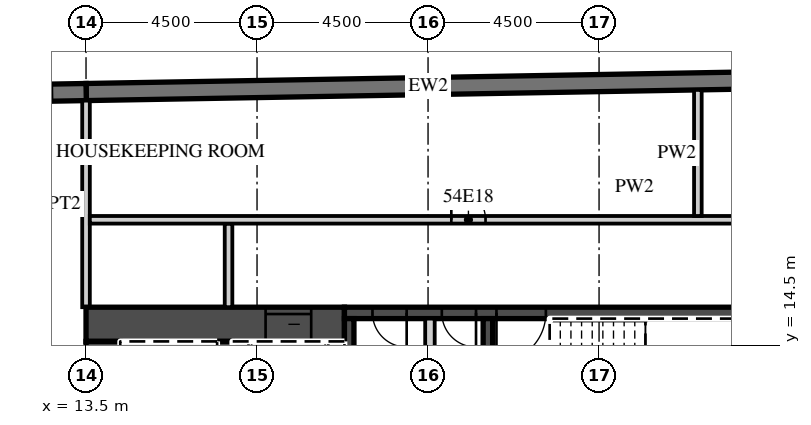
"""IFC4 building model, lengths in metres.
Left out: names, types, materials, properties, quantities, classifications, styles, units other than length and angle.
Written with IfcOpenShell. Run it as: python <this file> out.ifc"""

import sys

from ifc_helpers import new_model, si_unit, direction, frame, frame_2d, origin, place, context, subcontext, project, spatial, rectangle, extrude, element, fill, save


model = new_model("IFC4")
c1 = context("Model", 3, precision=1e-05, world=origin(), true_north=direction((0.0, 1.0)))
c2 = subcontext(c1, "Body", "Model", "MODEL_VIEW")
j1 = project(units=[si_unit("LENGTHUNIT", "METRE"), si_unit("PLANEANGLEUNIT", "RADIAN")], contexts=[c1])
p1 = place(None, origin())
s1 = spatial("IfcSite", under=j1, at=p1, CompositionType="ELEMENT")
p2 = place(p1, origin())
s2 = spatial("IfcBuilding", under=s1, at=p2, CompositionType="ELEMENT")
p3 = place(p2, frame((0.0, 0.0, 224.3)))
s3 = spatial("IfcBuildingStorey", under=s2, at=p3, CompositionType="ELEMENT", Elevation=224.3)
p4 = place(p3, frame((31.504, 21.476, 0.0), z_axis=(0.0, 0.0, 1.0), x_axis=(-0.999847677887, -0.017453395744, 0.0)))
e1 = element("IfcWall", 1, at=p4, inside=s3, PredefinedType="SOLIDWALL", context=c2, shape_type="SweptSolid", body=[
    extrude(rectangle(XDim=18.003, YDim=0.45, at=frame_2d((9.001, 0.0))), origin(), (0.0, 0.0, 1.0), 3.02),
])
p5 = place(p3, frame((13.504, 21.161, 0.0), z_axis=(0.0, 0.0, 1.0), x_axis=(-0.999847763257, -0.017448504532, 0.0)))
e2 = element("IfcWall", 2, at=p5, inside=s3, PredefinedType="SOLIDWALL", context=c2, shape_type="SweptSolid", body=[
    extrude(rectangle(XDim=46.859, YDim=0.45, at=frame_2d((23.43, 0.0))), origin(), (0.0, 0.0, 1.0), 3.02),
])
p6 = place(p5, frame((0.9, 0.0, 0.45)))
e3 = element("IfcOpeningElement", 3, at=p6, cuts=e2, PredefinedType="OPENING", context=c2, shape_type="SweptSolid", body=[
    extrude(rectangle(XDim=2.7, YDim=2.25, at=frame_2d((1.35, 1.125))), frame((0.0, 0.235, 0.0), z_axis=(0.0, -1.0, 0.0), x_axis=(1.0, 0.0, 0.0)), (0.0, 0.0, 1.0), 0.47),
])
p7 = place(p5, frame((5.401, 0.0, 0.45)))
e4 = element("IfcOpeningElement", 4, at=p7, cuts=e2, PredefinedType="OPENING", context=c2, shape_type="SweptSolid", body=[
    extrude(rectangle(XDim=2.7, YDim=2.25, at=frame_2d((1.35, 1.125))), frame((0.0, 0.235, 0.0), z_axis=(0.0, -1.0, 0.0), x_axis=(1.0, 0.0, 0.0)), (0.0, 0.0, 1.0), 0.47),
])
p8 = place(p5, frame((9.902, 0.0, 0.45)))
e5 = element("IfcOpeningElement", 5, at=p8, cuts=e2, PredefinedType="OPENING", context=c2, shape_type="SweptSolid", body=[
    extrude(rectangle(XDim=2.7, YDim=2.25, at=frame_2d((1.35, 1.125))), frame((0.0, 0.235, 0.0), z_axis=(0.0, -1.0, 0.0), x_axis=(1.0, 0.0, 0.0)), (0.0, 0.0, 1.0), 0.47),
])
p9 = place(p5, frame((14.402, 0.0, 0.45)))
e6 = element("IfcOpeningElement", 6, at=p9, cuts=e2, PredefinedType="OPENING", context=c2, shape_type="SweptSolid", body=[
    extrude(rectangle(XDim=2.7, YDim=2.25, at=frame_2d((1.35, 1.125))), frame((0.0, 0.235, 0.0), z_axis=(0.0, -1.0, 0.0), x_axis=(1.0, 0.0, 0.0)), (0.0, 0.0, 1.0), 0.47),
])
p10 = place(p5, frame((18.903, 0.0, 0.45)))
e7 = element("IfcOpeningElement", 7, at=p10, cuts=e2, PredefinedType="OPENING", context=c2, shape_type="SweptSolid", body=[
    extrude(rectangle(XDim=2.7, YDim=2.25, at=frame_2d((1.35, 1.125))), frame((0.0, 0.235, 0.0), z_axis=(0.0, -1.0, 0.0), x_axis=(1.0, 0.0, 0.0)), (0.0, 0.0, 1.0), 0.47),
])
p11 = place(p5, frame((23.404, 0.0, 0.45)))
e8 = element("IfcOpeningElement", 8, at=p11, cuts=e2, PredefinedType="OPENING", context=c2, shape_type="SweptSolid", body=[
    extrude(rectangle(XDim=2.7, YDim=2.25, at=frame_2d((1.35, 1.125))), frame((0.0, 0.235, 0.0), z_axis=(0.0, -1.0, 0.0), x_axis=(1.0, 0.0, 0.0)), (0.0, 0.0, 1.0), 0.47),
])
p12 = place(p5, frame((27.904, 0.0, 0.45)))
e9 = element("IfcOpeningElement", 9, at=p12, cuts=e2, PredefinedType="OPENING", context=c2, shape_type="SweptSolid", body=[
    extrude(rectangle(XDim=2.7, YDim=2.25, at=frame_2d((1.35, 1.125))), frame((0.0, 0.235, 0.0), z_axis=(0.0, -1.0, 0.0), x_axis=(1.0, 0.0, 0.0)), (0.0, 0.0, 1.0), 0.47),
])
p13 = place(p5, frame((32.405, 0.0, 0.45)))
e10 = element("IfcOpeningElement", 10, at=p13, cuts=e2, PredefinedType="OPENING", context=c2, shape_type="SweptSolid", body=[
    extrude(rectangle(XDim=2.7, YDim=2.25, at=frame_2d((1.35, 1.125))), frame((0.0, 0.235, 0.0), z_axis=(0.0, -1.0, 0.0), x_axis=(1.0, 0.0, 0.0)), (0.0, 0.0, 1.0), 0.47),
])
p14 = place(p5, frame((36.906, 0.0, 0.45)))
e11 = element("IfcOpeningElement", 11, at=p14, cuts=e2, PredefinedType="OPENING", context=c2, shape_type="SweptSolid", body=[
    extrude(rectangle(XDim=2.7, YDim=2.25, at=frame_2d((1.35, 1.125))), frame((0.0, 0.235, 0.0), z_axis=(0.0, -1.0, 0.0), x_axis=(1.0, 0.0, 0.0)), (0.0, 0.0, 1.0), 0.47),
])
p15 = place(p5, frame((41.406, 0.0, 0.45)))
e12 = element("IfcOpeningElement", 12, at=p15, cuts=e2, PredefinedType="OPENING", context=c2, shape_type="SweptSolid", body=[
    extrude(rectangle(XDim=2.7, YDim=2.25, at=frame_2d((1.35, 1.125))), frame((0.0, 0.235, 0.0), z_axis=(0.0, -1.0, 0.0), x_axis=(1.0, 0.0, 0.0)), (0.0, 0.0, 1.0), 0.47),
])
p16 = place(p3, frame((13.5, 15.5, 0.0), z_axis=(0.0, 0.0, 1.0), x_axis=(0.0, 1.0, 0.0)))
e13 = element("IfcWall", 13, at=p16, inside=s3, PredefinedType="PARTITIONING", context=c2, shape_type="SweptSolid", body=[
    extrude(rectangle(XDim=5.436, YDim=0.2, at=frame_2d((2.718, 0.0))), origin(), (0.0, 0.0, 1.0), 3.02),
])
p17 = place(p3, frame((13.5, 15.05, 0.0), z_axis=(0.0, 0.0, 1.0), x_axis=(1.0, 0.0, 0.0)))
e14 = element("IfcWall", 14, at=p17, inside=s3, PredefinedType="SHEAR", context=c2, shape_type="SweptSolid", body=[
    extrude(rectangle(XDim=6.8, YDim=0.9, at=frame_2d((3.4, 0.0))), origin(), (0.0, 0.0, 1.0), 3.02),
])
p18 = place(p17, frame((4.725, 0.0, 0.0)))
e15 = element("IfcOpeningElement", 15, at=p18, cuts=e14, PredefinedType="OPENING", context=c2, shape_type="SweptSolid", body=[
    extrude(rectangle(XDim=1.2, YDim=2.1, at=frame_2d((0.6, 1.05))), frame((0.0, 0.46, 0.0), z_axis=(0.0, -1.0, 0.0), x_axis=(1.0, 0.0, 0.0)), (0.0, 0.0, 1.0), 0.92),
])
p19 = place(p3, frame((20.3, 15.35, 0.0), z_axis=(0.0, 0.0, 1.0), x_axis=(1.0, 0.0, 0.0)))
e16 = element("IfcWall", 16, at=p19, inside=s3, PredefinedType="SHEAR", context=c2, shape_type="SweptSolid", body=[
    extrude(rectangle(XDim=10.3, YDim=0.3, at=frame_2d((5.15, 0.0))), origin(), (0.0, 0.0, 1.0), 3.02),
])
p20 = place(p19, frame((4.0, 0.0, 0.0)))
e17 = element("IfcOpeningElement", 17, at=p20, cuts=e16, PredefinedType="OPENING", context=c2, shape_type="SweptSolid", body=[
    extrude(rectangle(XDim=1.3, YDim=2.1, at=frame_2d((0.65, 1.05))), frame((0.0, 0.16, 0.0), z_axis=(0.0, -1.0, 0.0), x_axis=(1.0, 0.0, 0.0)), (0.0, 0.0, 1.0), 0.32),
])
p21 = place(p19, frame((2.562, 0.0, 0.0)))
e18 = element("IfcOpeningElement", 18, at=p21, cuts=e16, PredefinedType="OPENING", context=c2, shape_type="SweptSolid", body=[
    extrude(rectangle(XDim=0.9, YDim=2.1, at=frame_2d((0.45, 1.05))), frame((0.0, 0.16, 0.0), z_axis=(0.0, -1.0, 0.0), x_axis=(1.0, 0.0, 0.0)), (0.0, 0.0, 1.0), 0.32),
])
p22 = place(p19, frame((0.738, 0.0, 0.0)))
e19 = element("IfcOpeningElement", 19, at=p22, cuts=e16, PredefinedType="OPENING", context=c2, shape_type="SweptSolid", body=[
    extrude(rectangle(XDim=0.9, YDim=2.1, at=frame_2d((0.45, 1.05))), frame((0.0, 0.16, 0.0), z_axis=(0.0, -1.0, 0.0), x_axis=(1.0, 0.0, 0.0)), (0.0, 0.0, 1.0), 0.32),
])
p23 = place(p3, frame((13.95, 2.4, 0.0), z_axis=(0.0, 0.0, 1.0), x_axis=(0.0, 1.0, 0.0)))
e20 = element("IfcWall", 20, at=p23, inside=s3, PredefinedType="SHEAR", context=c2, shape_type="SweptSolid", body=[
    extrude(rectangle(XDim=12.2, YDim=0.9, at=frame_2d((6.1, 0.0))), origin(), (0.0, 0.0, 1.0), 3.02),
])
p24 = place(p3, frame((17.15, 8.8, 0.0), z_axis=(0.0, 0.0, 1.0), x_axis=(0.0, 1.0, 0.0)))
e21 = element("IfcWall", 21, at=p24, inside=s3, PredefinedType="SHEAR", context=c2, shape_type="SweptSolid", body=[
    extrude(rectangle(XDim=5.8, YDim=0.4, at=frame_2d((2.9, 0.0))), origin(), (0.0, 0.0, 1.0), 3.02),
])
for number, where, z_axis, x_axis in (
    (22, (20.425, 11.95, 0.0), (0.0, 0.0, 1.0), (0.0, 1.0, 0.0)),
    (23, (24.075, 11.95, 0.0), (0.0, 0.0, 1.0), (0.0, 1.0, 0.0)),
):
    element("IfcWall", number, at=place(p3, frame(where, z_axis=z_axis, x_axis=x_axis)), inside=s3, PredefinedType="SHEAR", context=c2, shape_type="SweptSolid", body=[
        extrude(rectangle(XDim=3.25, YDim=0.25, at=frame_2d((1.625, 0.0))), origin(), (0.0, 0.0, 1.0), 3.02),
    ])
p25 = place(p3, frame((22.55, 11.95, 0.0), z_axis=(0.0, 0.0, 1.0), x_axis=(0.0, 1.0, 0.0)))
e24 = element("IfcWall", 24, at=p25, inside=s3, PredefinedType="PARTITIONING", context=c2, shape_type="SweptSolid", body=[
    extrude(rectangle(XDim=3.25, YDim=0.25, at=frame_2d((1.625, 0.0))), origin(), (0.0, 0.0, 1.0), 3.02),
])
p26 = place(p3, frame((17.25, 15.5, 0.0), z_axis=(0.0, 0.0, 1.0), x_axis=(0.0, 1.0, 0.0)))
e25 = element("IfcWall", 25, at=p26, inside=s3, PredefinedType="PARTITIONING", context=c2, shape_type="SweptSolid", body=[
    extrude(rectangle(XDim=2.2, YDim=0.2, at=frame_2d((1.1, 0.0))), origin(), (0.0, 0.0, 1.0), 3.02),
])
p27 = place(p3, frame((13.6, 17.8, 0.0), z_axis=(0.0, 0.0, 1.0), x_axis=(1.0, 0.0, 0.0)))
e26 = element("IfcWall", 26, at=p27, inside=s3, PredefinedType="PARTITIONING", context=c2, shape_type="SweptSolid", body=[
    extrude(rectangle(XDim=28.657, YDim=0.2, at=frame_2d((14.329, 0.0))), origin(), (0.0, 0.0, 1.0), 3.02),
])
p28 = place(p27, frame((17.812, 0.0, 0.0)))
e27 = element("IfcOpeningElement", 27, at=p28, cuts=e26, PredefinedType="OPENING", context=c2, shape_type="SweptSolid", body=[
    extrude(rectangle(XDim=0.9, YDim=2.1, at=frame_2d((0.45, 1.05))), frame((0.0, 0.11, 0.0), z_axis=(0.0, -1.0, 0.0), x_axis=(1.0, 0.0, 0.0)), (0.0, 0.0, 1.0), 0.22),
])
p29 = place(p27, frame((9.512, 0.0, 0.0)))
e28 = element("IfcOpeningElement", 28, at=p29, cuts=e26, PredefinedType="OPENING", context=c2, shape_type="SweptSolid", body=[
    extrude(rectangle(XDim=0.9, YDim=2.1, at=frame_2d((0.45, 1.05))), frame((0.0, 0.11, 0.0), z_axis=(0.0, -1.0, 0.0), x_axis=(1.0, 0.0, 0.0)), (0.0, 0.0, 1.0), 0.22),
])
p30 = place(p3, frame((29.6, 17.9, 0.0), z_axis=(0.0, 0.0, 1.0), x_axis=(0.0, 1.0, 0.0)))
e29 = element("IfcWall", 29, at=p30, inside=s3, PredefinedType="PARTITIONING", context=c2, shape_type="SweptSolid", body=[
    extrude(rectangle(XDim=3.318, YDim=0.2, at=frame_2d((1.659, 0.0))), origin(), (0.0, 0.0, 1.0), 3.02),
])
p31 = place(p6, origin())
e30 = element("IfcWindow", 30, at=p31, inside=s3, PartitioningType="SINGLE_PANEL", PredefinedType="WINDOW", context=c2, shape_type="SweptSolid", body=[
    extrude(rectangle(XDim=2.7, YDim=2.25, at=frame_2d((1.35, 1.125))), frame((0.0, 0.09, 0.0), z_axis=(0.0, -1.0, 0.0), x_axis=(1.0, 0.0, 0.0)), (0.0, 0.0, 1.0), 0.06),
])
fill(e3, e30)
p32 = place(p18, origin())
e31 = element("IfcDoor", 31, at=p32, inside=s3, OperationType="SLIDING_TO_LEFT", PredefinedType="DOOR", context=c2, shape_type="SweptSolid", body=[
    extrude(rectangle(XDim=1.2, YDim=2.1, at=frame_2d((0.6, 1.05))), frame((0.0, 0.025, 0.0), z_axis=(0.0, -1.0, 0.0), x_axis=(1.0, 0.0, 0.0)), (0.0, 0.0, 1.0), 0.05),
])
fill(e15, e31)
p33 = place(p20, origin())
e32 = element("IfcDoor", 32, at=p33, inside=s3, OperationType="SINGLE_SWING_LEFT", PredefinedType="DOOR", context=c2, shape_type="SweptSolid", body=[
    extrude(rectangle(XDim=1.3, YDim=2.1, at=frame_2d((0.65, 1.05))), frame((0.0, 0.025, 0.0), z_axis=(0.0, -1.0, 0.0), x_axis=(1.0, 0.0, 0.0)), (0.0, 0.0, 1.0), 0.05),
])
fill(e17, e32)
p34 = place(p21, origin())
e33 = element("IfcDoor", 33, at=p34, inside=s3, OperationType="SINGLE_SWING_RIGHT", PredefinedType="DOOR", context=c2, shape_type="SweptSolid", body=[
    extrude(rectangle(XDim=0.9, YDim=2.1, at=frame_2d((0.45, 1.05))), frame((0.0, 0.025, 0.0), z_axis=(0.0, -1.0, 0.0), x_axis=(1.0, 0.0, 0.0)), (0.0, 0.0, 1.0), 0.05),
])
fill(e18, e33)
p35 = place(p22, origin())
e34 = element("IfcDoor", 34, at=p35, inside=s3, OperationType="SINGLE_SWING_RIGHT", PredefinedType="DOOR", context=c2, shape_type="SweptSolid", body=[
    extrude(rectangle(XDim=0.9, YDim=2.1, at=frame_2d((0.45, 1.05))), frame((0.0, 0.025, 0.0), z_axis=(0.0, -1.0, 0.0), x_axis=(1.0, 0.0, 0.0)), (0.0, 0.0, 1.0), 0.05),
])
fill(e19, e34)
p36 = place(p29, origin())
e35 = element("IfcDoor", 35, at=p36, inside=s3, OperationType="SINGLE_SWING_LEFT", PredefinedType="DOOR", context=c2, shape_type="SweptSolid", body=[
    extrude(rectangle(XDim=0.9, YDim=2.1, at=frame_2d((0.45, 1.05))), frame((0.0, 0.025, 0.0), z_axis=(0.0, -1.0, 0.0), x_axis=(1.0, 0.0, 0.0)), (0.0, 0.0, 1.0), 0.05),
])
fill(e28, e35)
save(model, sys.argv[1])
